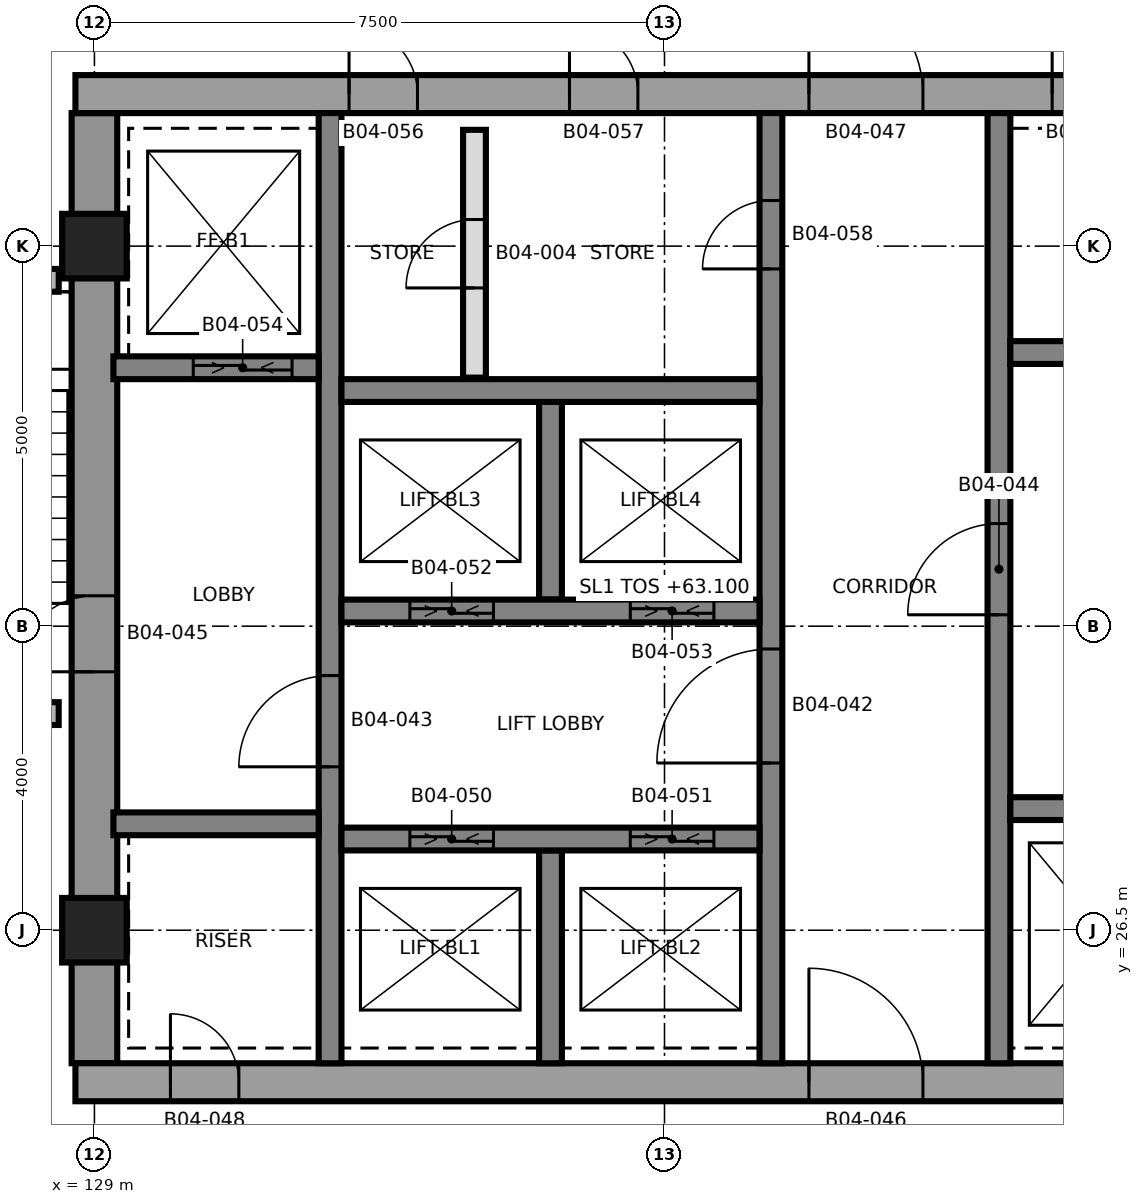
"""IFC4 building model, lengths in metres.
Left out: names, types, materials, properties, quantities, classifications, styles, units other than length and angle.
Written with IfcOpenShell. Run it as: python <this file> out.ifc"""

import sys

from ifc_helpers import new_model, si_unit, direction, frame, frame_2d, origin, origin_2d, place, context, subcontext, project, spatial, rectangle, extrude, element, fill, save


model = new_model("IFC4")
c1 = context("Model", 3, precision=1e-05, world=origin(), true_north=direction((0.0, 1.0)))
c2 = subcontext(c1, "Body", "Model", "MODEL_VIEW")
j1 = project(units=[si_unit("LENGTHUNIT", "METRE"), si_unit("PLANEANGLEUNIT", "RADIAN")], contexts=[c1])
p1 = place(None, origin())
s1 = spatial("IfcSite", under=j1, at=p1, CompositionType="ELEMENT")
p2 = place(p1, origin())
s2 = spatial("IfcBuilding", under=s1, at=p2, CompositionType="ELEMENT")
p3 = place(p2, frame((0.0, 0.0, 63.1)))
s3 = spatial("IfcBuildingStorey", under=s2, at=p3, CompositionType="ELEMENT", Elevation=63.1)
p4 = place(p3, frame((129.0, 24.75, 0.0), z_axis=(0.0, 0.0, 1.0), x_axis=(0.0, 1.0, 0.0)))
e1 = element("IfcWall", 1, at=p4, inside=s3, PredefinedType="SHEAR", context=c2, shape_type="SweptSolid", body=[
    extrude(rectangle(XDim=12.5, YDim=0.6, at=frame_2d((6.25, 0.0))), origin(), (0.0, 0.0, 1.0), 3.7),
])
p5 = place(p4, frame((5.15, 0.0, 0.0)))
e2 = element("IfcOpeningElement", 2, at=p5, cuts=e1, PredefinedType="OPENING", context=c2, shape_type="SweptSolid", body=[
    extrude(rectangle(XDim=1.0, YDim=2.1, at=frame_2d((0.5, 1.05))), frame((0.0, 0.31, 0.0), z_axis=(0.0, -1.0, 0.0), x_axis=(1.0, 0.0, 0.0)), (0.0, 0.0, 1.0), 0.62),
])
p6 = place(p3, frame((128.75, 24.5, 0.0), z_axis=(0.0, 0.0, 1.0), x_axis=(1.0, 0.0, 0.0)))
e3 = element("IfcWall", 3, at=p6, inside=s3, PredefinedType="SHEAR", context=c2, shape_type="SweptSolid", body=[
    extrude(rectangle(XDim=15.0, YDim=0.5, at=frame_2d((7.5, 0.0))), origin(), (0.0, 0.0, 1.0), 3.7),
])
p7 = place(p6, frame((9.65, 0.0, 0.0)))
e4 = element("IfcOpeningElement", 4, at=p7, cuts=e3, PredefinedType="OPENING", context=c2, shape_type="SweptSolid", body=[
    extrude(rectangle(XDim=1.5, YDim=2.1, at=frame_2d((0.75, 1.05))), frame((0.0, 0.26, 0.0), z_axis=(0.0, -1.0, 0.0), x_axis=(1.0, 0.0, 0.0)), (0.0, 0.0, 1.0), 0.52),
])
p8 = place(p6, frame((1.25, 0.0, 0.0)))
e5 = element("IfcOpeningElement", 5, at=p8, cuts=e3, PredefinedType="OPENING", context=c2, shape_type="SweptSolid", body=[
    extrude(rectangle(XDim=0.9, YDim=2.1, at=frame_2d((0.45, 1.05))), frame((0.0, 0.26, 0.0), z_axis=(0.0, -1.0, 0.0), x_axis=(1.0, 0.0, 0.0)), (0.0, 0.0, 1.0), 0.52),
])
p9 = place(p3, frame((128.75, 37.5, 0.0), z_axis=(0.0, 0.0, 1.0), x_axis=(1.0, 0.0, 0.0)))
e6 = element("IfcWall", 6, at=p9, inside=s3, PredefinedType="SHEAR", context=c2, shape_type="SweptSolid", body=[
    extrude(rectangle(XDim=15.0, YDim=0.5, at=frame_2d((7.5, 0.0))), origin(), (0.0, 0.0, 1.0), 3.7),
])
p10 = place(p9, frame((9.65, 0.0, 0.0)))
e7 = element("IfcOpeningElement", 7, at=p10, cuts=e6, PredefinedType="OPENING", context=c2, shape_type="SweptSolid", body=[
    extrude(rectangle(XDim=1.5, YDim=2.1, at=frame_2d((0.75, 1.05))), frame((0.0, 0.26, 0.0), z_axis=(0.0, -1.0, 0.0), x_axis=(1.0, 0.0, 0.0)), (0.0, 0.0, 1.0), 0.52),
])
p11 = place(p9, frame((12.85, 0.0, 0.0)))
e8 = element("IfcOpeningElement", 8, at=p11, cuts=e6, PredefinedType="OPENING", context=c2, shape_type="SweptSolid", body=[
    extrude(rectangle(XDim=0.9, YDim=2.1, at=frame_2d((0.45, 1.05))), frame((0.0, 0.26, 0.0), z_axis=(0.0, -1.0, 0.0), x_axis=(1.0, 0.0, 0.0)), (0.0, 0.0, 1.0), 0.52),
])
p12 = place(p9, frame((3.6, 0.0, 0.0)))
e9 = element("IfcOpeningElement", 9, at=p12, cuts=e6, PredefinedType="OPENING", context=c2, shape_type="SweptSolid", body=[
    extrude(rectangle(XDim=0.9, YDim=2.1, at=frame_2d((0.45, 1.05))), frame((0.0, 0.26, 0.0), z_axis=(0.0, -1.0, 0.0), x_axis=(1.0, 0.0, 0.0)), (0.0, 0.0, 1.0), 0.52),
])
p13 = place(p9, frame((6.5, 0.0, 0.0)))
e10 = element("IfcOpeningElement", 10, at=p13, cuts=e6, PredefinedType="OPENING", context=c2, shape_type="SweptSolid", body=[
    extrude(rectangle(XDim=0.9, YDim=2.1, at=frame_2d((0.45, 1.05))), frame((0.0, 0.26, 0.0), z_axis=(0.0, -1.0, 0.0), x_axis=(1.0, 0.0, 0.0)), (0.0, 0.0, 1.0), 0.52),
])
p14 = place(p3, frame((132.1, 24.75, 0.0), z_axis=(0.0, 0.0, 1.0), x_axis=(0.0, 1.0, 0.0)))
e11 = element("IfcWall", 11, at=p14, inside=s3, PredefinedType="SHEAR", context=c2, shape_type="SweptSolid", body=[
    extrude(rectangle(XDim=12.5, YDim=0.3, at=frame_2d((6.25, 0.0))), origin(), (0.0, 0.0, 1.0), 3.7),
])
p15 = place(p14, frame((3.9, 0.0, 0.0)))
e12 = element("IfcOpeningElement", 12, at=p15, cuts=e11, PredefinedType="OPENING", context=c2, shape_type="SweptSolid", body=[
    extrude(rectangle(XDim=1.2, YDim=2.1, at=frame_2d((0.6, 1.05))), frame((0.0, 0.16, 0.0), z_axis=(0.0, -1.0, 0.0), x_axis=(1.0, 0.0, 0.0)), (0.0, 0.0, 1.0), 0.32),
])
p16 = place(p3, frame((137.9, 24.75, 0.0), z_axis=(0.0, 0.0, 1.0), x_axis=(0.0, 1.0, 0.0)))
e13 = element("IfcWall", 13, at=p16, inside=s3, PredefinedType="SHEAR", context=c2, shape_type="SweptSolid", body=[
    extrude(rectangle(XDim=12.5, YDim=0.3, at=frame_2d((6.25, 0.0))), origin(), (0.0, 0.0, 1.0), 3.7),
])
p17 = place(p16, frame((3.95, 0.0, 0.0)))
e14 = element("IfcOpeningElement", 14, at=p17, cuts=e13, PredefinedType="OPENING", context=c2, shape_type="SweptSolid", body=[
    extrude(rectangle(XDim=1.5, YDim=2.1, at=frame_2d((0.75, 1.05))), frame((0.0, 0.16, 0.0), z_axis=(0.0, -1.0, 0.0), x_axis=(1.0, 0.0, 0.0)), (0.0, 0.0, 1.0), 0.32),
])
p18 = place(p16, frame((10.45, 0.0, 0.0)))
e15 = element("IfcOpeningElement", 15, at=p18, cuts=e13, PredefinedType="OPENING", context=c2, shape_type="SweptSolid", body=[
    extrude(rectangle(XDim=0.9, YDim=2.1, at=frame_2d((0.45, 1.05))), frame((0.0, 0.16, 0.0), z_axis=(0.0, -1.0, 0.0), x_axis=(1.0, 0.0, 0.0)), (0.0, 0.0, 1.0), 0.32),
])
p19 = place(p3, frame((140.9, 24.75, 0.0), z_axis=(0.0, 0.0, 1.0), x_axis=(0.0, 1.0, 0.0)))
e16 = element("IfcWall", 16, at=p19, inside=s3, PredefinedType="SHEAR", context=c2, shape_type="SweptSolid", body=[
    extrude(rectangle(XDim=12.5, YDim=0.3, at=frame_2d((6.25, 0.0))), origin(), (0.0, 0.0, 1.0), 3.7),
])
p20 = place(p19, frame((5.9, 0.0, 0.0)))
e17 = element("IfcOpeningElement", 17, at=p20, cuts=e16, PredefinedType="OPENING", context=c2, shape_type="SweptSolid", body=[
    extrude(rectangle(XDim=1.2, YDim=2.1, at=frame_2d((0.6, 1.05))), frame((0.0, 0.16, 0.0), z_axis=(0.0, -1.0, 0.0), x_axis=(1.0, 0.0, 0.0)), (0.0, 0.0, 1.0), 0.32),
])
p21 = place(p3, frame((135.0, 24.75, 0.0), z_axis=(0.0, 0.0, 1.0), x_axis=(0.0, 1.0, 0.0)))
e18 = element("IfcWall", 18, at=p21, inside=s3, PredefinedType="SHEAR", context=c2, shape_type="SweptSolid", body=[
    extrude(rectangle(XDim=2.8, YDim=0.3, at=frame_2d((1.4, 0.0))), origin(), (0.0, 0.0, 1.0), 3.7),
])
p22 = place(p3, frame((135.0, 30.85, 0.0), z_axis=(0.0, 0.0, 1.0), x_axis=(0.0, 1.0, 0.0)))
e19 = element("IfcWall", 19, at=p22, inside=s3, PredefinedType="SHEAR", context=c2, shape_type="SweptSolid", body=[
    extrude(rectangle(XDim=2.6, YDim=0.3, at=frame_2d((1.3, 0.0))), origin(), (0.0, 0.0, 1.0), 3.7),
])
p23 = place(p3, frame((132.25, 27.7, 0.0), z_axis=(0.0, 0.0, 1.0), x_axis=(1.0, 0.0, 0.0)))
e20 = element("IfcWall", 20, at=p23, inside=s3, PredefinedType="SHEAR", context=c2, shape_type="SweptSolid", body=[
    extrude(rectangle(XDim=5.5, YDim=0.3, at=frame_2d((2.75, 0.0))), origin(), (0.0, 0.0, 1.0), 3.7),
])
p24 = place(p23, frame((0.9, 0.0, 0.0)))
e21 = element("IfcOpeningElement", 21, at=p24, cuts=e20, PredefinedType="OPENING", context=c2, shape_type="SweptSolid", body=[
    extrude(rectangle(XDim=1.1, YDim=2.4, at=frame_2d((0.55, 1.2))), frame((0.0, 0.16, 0.0), z_axis=(0.0, -1.0, 0.0), x_axis=(1.0, 0.0, 0.0)), (0.0, 0.0, 1.0), 0.32),
])
p25 = place(p23, frame((3.8, 0.0, 0.0)))
e22 = element("IfcOpeningElement", 22, at=p25, cuts=e20, PredefinedType="OPENING", context=c2, shape_type="SweptSolid", body=[
    extrude(rectangle(XDim=1.1, YDim=2.4, at=frame_2d((0.55, 1.2))), frame((0.0, 0.16, 0.0), z_axis=(0.0, -1.0, 0.0), x_axis=(1.0, 0.0, 0.0)), (0.0, 0.0, 1.0), 0.32),
])
p26 = place(p3, frame((132.25, 30.7, 0.0), z_axis=(0.0, 0.0, 1.0), x_axis=(1.0, 0.0, 0.0)))
e23 = element("IfcWall", 23, at=p26, inside=s3, PredefinedType="SHEAR", context=c2, shape_type="SweptSolid", body=[
    extrude(rectangle(XDim=5.5, YDim=0.3, at=frame_2d((2.75, 0.0))), origin(), (0.0, 0.0, 1.0), 3.7),
])
p27 = place(p26, frame((0.9, 0.0, 0.0)))
e24 = element("IfcOpeningElement", 24, at=p27, cuts=e23, PredefinedType="OPENING", context=c2, shape_type="SweptSolid", body=[
    extrude(rectangle(XDim=1.1, YDim=2.4, at=frame_2d((0.55, 1.2))), frame((0.0, 0.16, 0.0), z_axis=(0.0, -1.0, 0.0), x_axis=(1.0, 0.0, 0.0)), (0.0, 0.0, 1.0), 0.32),
])
p28 = place(p26, frame((3.8, 0.0, 0.0)))
e25 = element("IfcOpeningElement", 25, at=p28, cuts=e23, PredefinedType="OPENING", context=c2, shape_type="SweptSolid", body=[
    extrude(rectangle(XDim=1.1, YDim=2.4, at=frame_2d((0.55, 1.2))), frame((0.0, 0.16, 0.0), z_axis=(0.0, -1.0, 0.0), x_axis=(1.0, 0.0, 0.0)), (0.0, 0.0, 1.0), 0.32),
])
p29 = place(p3, frame((132.25, 33.6, 0.0), z_axis=(0.0, 0.0, 1.0), x_axis=(1.0, 0.0, 0.0)))
e26 = element("IfcWall", 26, at=p29, inside=s3, PredefinedType="SHEAR", context=c2, shape_type="SweptSolid", body=[
    extrude(rectangle(XDim=5.5, YDim=0.3, at=frame_2d((2.75, 0.0))), origin(), (0.0, 0.0, 1.0), 3.7),
])
p30 = place(p3, frame((129.25, 27.9, 0.0), z_axis=(0.0, 0.0, 1.0), x_axis=(1.0, 0.0, 0.0)))
e27 = element("IfcWall", 27, at=p30, inside=s3, PredefinedType="SHEAR", context=c2, shape_type="SweptSolid", body=[
    extrude(rectangle(XDim=2.7, YDim=0.3, at=frame_2d((1.35, 0.0))), origin(), (0.0, 0.0, 1.0), 3.7),
])
p31 = place(p3, frame((129.25, 33.9, 0.0), z_axis=(0.0, 0.0, 1.0), x_axis=(1.0, 0.0, 0.0)))
e28 = element("IfcWall", 28, at=p31, inside=s3, PredefinedType="SHEAR", context=c2, shape_type="SweptSolid", body=[
    extrude(rectangle(XDim=2.7, YDim=0.3, at=frame_2d((1.35, 0.0))), origin(), (0.0, 0.0, 1.0), 3.7),
])
p32 = place(p31, frame((1.05, 0.0, 0.0)))
e29 = element("IfcOpeningElement", 29, at=p32, cuts=e28, PredefinedType="OPENING", context=c2, shape_type="SweptSolid", body=[
    extrude(rectangle(XDim=1.3, YDim=2.4, at=frame_2d((0.65, 1.2))), frame((0.0, 0.16, 0.0), z_axis=(0.0, -1.0, 0.0), x_axis=(1.0, 0.0, 0.0)), (0.0, 0.0, 1.0), 0.32),
])
p33 = place(p3, frame((141.05, 28.1, 0.0), z_axis=(0.0, 0.0, 1.0), x_axis=(1.0, 0.0, 0.0)))
e30 = element("IfcWall", 30, at=p33, inside=s3, PredefinedType="SHEAR", context=c2, shape_type="SweptSolid", body=[
    extrude(rectangle(XDim=2.7, YDim=0.3, at=frame_2d((1.35, 0.0))), origin(), (0.0, 0.0, 1.0), 3.7),
])
p34 = place(p33, frame((0.75, 0.0, 0.0)))
e31 = element("IfcOpeningElement", 31, at=p34, cuts=e30, PredefinedType="OPENING", context=c2, shape_type="SweptSolid", body=[
    extrude(rectangle(XDim=1.3, YDim=2.4, at=frame_2d((0.65, 1.2))), frame((0.0, 0.16, 0.0), z_axis=(0.0, -1.0, 0.0), x_axis=(1.0, 0.0, 0.0)), (0.0, 0.0, 1.0), 0.32),
])
p35 = place(p3, frame((141.05, 34.1, 0.0), z_axis=(0.0, 0.0, 1.0), x_axis=(1.0, 0.0, 0.0)))
e32 = element("IfcWall", 32, at=p35, inside=s3, PredefinedType="SHEAR", context=c2, shape_type="SweptSolid", body=[
    extrude(rectangle(XDim=2.7, YDim=0.3, at=frame_2d((1.35, 0.0))), origin(), (0.0, 0.0, 1.0), 3.7),
])
for number, where, z_axis, x_axis in (
    (33, (129.0, 26.5, 0.0), (0.0, 0.0, 1.0), (1.0, 0.0, 0.0)),
    (34, (129.0, 35.5, 0.0), (0.0, 0.0, 1.0), (1.0, 0.0, 0.0)),
):
    element("IfcColumn", number, at=place(p3, frame(where, z_axis=z_axis, x_axis=x_axis)), inside=s3, PredefinedType="COLUMN", context=c2, shape_type="SweptSolid", body=[
        extrude(rectangle(XDim=0.85, YDim=0.85, at=origin_2d()), origin(), (0.0, 0.0, 1.0), 3.7),
    ])
p36 = place(p3, frame((125.7, 29.35, 0.0), z_axis=(0.0, 0.0, 1.0), x_axis=(1.0, 0.0, 0.0)))
e35 = element("IfcWall", 35, at=p36, inside=s3, PredefinedType="SHEAR", context=c2, shape_type="SweptSolid", body=[
    extrude(rectangle(XDim=2.83, YDim=0.3, at=frame_2d((1.415, 0.0))), origin(), (0.0, 0.0, 1.0), 3.4),
])
p37 = place(p36, frame((0.975, 0.0, 0.0)))
e36 = element("IfcOpeningElement", 36, at=p37, cuts=e35, PredefinedType="OPENING", context=c2, shape_type="SweptSolid", body=[
    extrude(rectangle(XDim=1.2, YDim=2.1, at=frame_2d((0.6, 1.05))), frame((0.0, 0.16, 0.0), z_axis=(0.0, -1.0, 0.0), x_axis=(1.0, 0.0, 0.0)), (0.0, 0.0, 1.0), 0.32),
])
p38 = place(p3, frame((125.7, 35.05, 0.0), z_axis=(0.0, 0.0, 1.0), x_axis=(1.0, 0.0, 0.0)))
e37 = element("IfcWall", 37, at=p38, inside=s3, PredefinedType="SHEAR", context=c2, shape_type="SweptSolid", body=[
    extrude(rectangle(XDim=2.83, YDim=0.3, at=frame_2d((1.415, 0.0))), origin(), (0.0, 0.0, 1.0), 3.4),
])
p39 = place(p3, frame((134.0, 33.77, 0.0), z_axis=(0.0, 0.0, 1.0), x_axis=(0.0, 1.0, 0.0)))
e38 = element("IfcWall", 38, at=p39, inside=s3, PredefinedType="PARTITIONING", context=c2, shape_type="SweptSolid", body=[
    extrude(rectangle(XDim=3.26, YDim=0.3, at=frame_2d((1.63, 0.0))), origin(), (0.0, 0.0, 1.0), 3.4),
])
p40 = place(p39, frame((1.18, 0.0, 0.0)))
e39 = element("IfcOpeningElement", 39, at=p40, cuts=e38, PredefinedType="OPENING", context=c2, shape_type="SweptSolid", body=[
    extrude(rectangle(XDim=0.9, YDim=2.1, at=frame_2d((0.45, 1.05))), frame((0.0, 0.16, 0.0), z_axis=(0.0, -1.0, 0.0), x_axis=(1.0, 0.0, 0.0)), (0.0, 0.0, 1.0), 0.32),
])
p41 = place(p40, origin())
e40 = element("IfcDoor", 40, at=p41, inside=s3, OperationType="SINGLE_SWING_RIGHT", PredefinedType="DOOR", context=c2, shape_type="SweptSolid", body=[
    extrude(rectangle(XDim=0.9, YDim=2.1, at=frame_2d((0.45, 1.05))), frame((0.0, 0.025, 0.0), z_axis=(0.0, -1.0, 0.0), x_axis=(1.0, 0.0, 0.0)), (0.0, 0.0, 1.0), 0.05),
])
fill(e39, e40)
p42 = place(p17, origin())
e41 = element("IfcDoor", 41, at=p42, inside=s3, OperationType="SINGLE_SWING_RIGHT", PredefinedType="DOOR", context=c2, shape_type="SweptSolid", body=[
    extrude(rectangle(XDim=1.5, YDim=2.1, at=frame_2d((0.75, 1.05))), frame((0.0, 0.025, 0.0), z_axis=(0.0, -1.0, 0.0), x_axis=(1.0, 0.0, 0.0)), (0.0, 0.0, 1.0), 0.05),
])
fill(e14, e41)
p43 = place(p15, origin())
e42 = element("IfcDoor", 42, at=p43, inside=s3, OperationType="SINGLE_SWING_LEFT", PredefinedType="DOOR", context=c2, shape_type="SweptSolid", body=[
    extrude(rectangle(XDim=1.2, YDim=2.1, at=frame_2d((0.6, 1.05))), frame((0.0, 0.025, 0.0), z_axis=(0.0, -1.0, 0.0), x_axis=(1.0, 0.0, 0.0)), (0.0, 0.0, 1.0), 0.05),
])
fill(e12, e42)
p44 = place(p20, origin())
e43 = element("IfcDoor", 43, at=p44, inside=s3, OperationType="SINGLE_SWING_RIGHT", PredefinedType="DOOR", context=c2, shape_type="SweptSolid", body=[
    extrude(rectangle(XDim=1.2, YDim=2.1, at=frame_2d((0.6, 1.05))), frame((0.0, 0.025, 0.0), z_axis=(0.0, -1.0, 0.0), x_axis=(1.0, 0.0, 0.0)), (0.0, 0.0, 1.0), 0.05),
])
fill(e17, e43)
p45 = place(p5, origin())
e44 = element("IfcDoor", 44, at=p45, inside=s3, OperationType="SINGLE_SWING_RIGHT", PredefinedType="DOOR", context=c2, shape_type="SweptSolid", body=[
    extrude(rectangle(XDim=1.0, YDim=2.1, at=frame_2d((0.5, 1.05))), frame((0.0, 0.025, 0.0), z_axis=(0.0, -1.0, 0.0), x_axis=(1.0, 0.0, 0.0)), (0.0, 0.0, 1.0), 0.05),
])
fill(e2, e44)
p46 = place(p7, origin())
e45 = element("IfcDoor", 45, at=p46, inside=s3, OperationType="SINGLE_SWING_LEFT", PredefinedType="DOOR", context=c2, shape_type="SweptSolid", body=[
    extrude(rectangle(XDim=1.5, YDim=2.1, at=frame_2d((0.75, 1.05))), frame((0.0, 0.025, 0.0), z_axis=(0.0, -1.0, 0.0), x_axis=(1.0, 0.0, 0.0)), (0.0, 0.0, 1.0), 0.05),
])
fill(e4, e45)
p47 = place(p10, origin())
e46 = element("IfcDoor", 46, at=p47, inside=s3, OperationType="SINGLE_SWING_RIGHT", PredefinedType="DOOR", context=c2, shape_type="SweptSolid", body=[
    extrude(rectangle(XDim=1.5, YDim=2.1, at=frame_2d((0.75, 1.05))), frame((0.0, 0.025, 0.0), z_axis=(0.0, -1.0, 0.0), x_axis=(1.0, 0.0, 0.0)), (0.0, 0.0, 1.0), 0.05),
])
fill(e7, e46)
p48 = place(p8, origin())
e47 = element("IfcDoor", 47, at=p48, inside=s3, OperationType="SINGLE_SWING_LEFT", PredefinedType="DOOR", context=c2, shape_type="SweptSolid", body=[
    extrude(rectangle(XDim=0.9, YDim=2.1, at=frame_2d((0.45, 1.05))), frame((0.0, 0.025, 0.0), z_axis=(0.0, -1.0, 0.0), x_axis=(1.0, 0.0, 0.0)), (0.0, 0.0, 1.0), 0.05),
])
fill(e5, e47)
p49 = place(p11, origin())
e48 = element("IfcDoor", 48, at=p49, inside=s3, OperationType="SINGLE_SWING_RIGHT", PredefinedType="DOOR", context=c2, shape_type="SweptSolid", body=[
    extrude(rectangle(XDim=0.9, YDim=2.1, at=frame_2d((0.45, 1.05))), frame((0.0, 0.025, 0.0), z_axis=(0.0, -1.0, 0.0), x_axis=(1.0, 0.0, 0.0)), (0.0, 0.0, 1.0), 0.05),
])
fill(e8, e48)
p50 = place(p24, origin())
e49 = element("IfcDoor", 49, at=p50, inside=s3, OperationType="SLIDING_TO_LEFT", PredefinedType="DOOR", context=c2, shape_type="SweptSolid", body=[
    extrude(rectangle(XDim=1.1, YDim=2.4, at=frame_2d((0.55, 1.2))), frame((0.0, 0.025, 0.0), z_axis=(0.0, -1.0, 0.0), x_axis=(1.0, 0.0, 0.0)), (0.0, 0.0, 1.0), 0.05),
])
fill(e21, e49)
p51 = place(p25, origin())
e50 = element("IfcDoor", 50, at=p51, inside=s3, OperationType="SLIDING_TO_LEFT", PredefinedType="DOOR", context=c2, shape_type="SweptSolid", body=[
    extrude(rectangle(XDim=1.1, YDim=2.4, at=frame_2d((0.55, 1.2))), frame((0.0, 0.025, 0.0), z_axis=(0.0, -1.0, 0.0), x_axis=(1.0, 0.0, 0.0)), (0.0, 0.0, 1.0), 0.05),
])
fill(e22, e50)
p52 = place(p27, origin())
e51 = element("IfcDoor", 51, at=p52, inside=s3, OperationType="SLIDING_TO_LEFT", PredefinedType="DOOR", context=c2, shape_type="SweptSolid", body=[
    extrude(rectangle(XDim=1.1, YDim=2.4, at=frame_2d((0.55, 1.2))), frame((0.0, 0.025, 0.0), z_axis=(0.0, -1.0, 0.0), x_axis=(1.0, 0.0, 0.0)), (0.0, 0.0, 1.0), 0.05),
])
fill(e24, e51)
p53 = place(p28, origin())
e52 = element("IfcDoor", 52, at=p53, inside=s3, OperationType="SLIDING_TO_LEFT", PredefinedType="DOOR", context=c2, shape_type="SweptSolid", body=[
    extrude(rectangle(XDim=1.1, YDim=2.4, at=frame_2d((0.55, 1.2))), frame((0.0, 0.025, 0.0), z_axis=(0.0, -1.0, 0.0), x_axis=(1.0, 0.0, 0.0)), (0.0, 0.0, 1.0), 0.05),
])
fill(e25, e52)
p54 = place(p32, origin())
e53 = element("IfcDoor", 53, at=p54, inside=s3, OperationType="SLIDING_TO_LEFT", PredefinedType="DOOR", context=c2, shape_type="SweptSolid", body=[
    extrude(rectangle(XDim=1.3, YDim=2.4, at=frame_2d((0.65, 1.2))), frame((0.0, 0.025, 0.0), z_axis=(0.0, -1.0, 0.0), x_axis=(1.0, 0.0, 0.0)), (0.0, 0.0, 1.0), 0.05),
])
fill(e29, e53)
p55 = place(p12, origin())
e54 = element("IfcDoor", 54, at=p55, inside=s3, OperationType="SINGLE_SWING_LEFT", PredefinedType="DOOR", context=c2, shape_type="SweptSolid", body=[
    extrude(rectangle(XDim=0.9, YDim=2.1, at=frame_2d((0.45, 1.05))), frame((0.0, 0.025, 0.0), z_axis=(0.0, -1.0, 0.0), x_axis=(1.0, 0.0, 0.0)), (0.0, 0.0, 1.0), 0.05),
])
fill(e9, e54)
p56 = place(p13, origin())
e55 = element("IfcDoor", 55, at=p56, inside=s3, OperationType="SINGLE_SWING_RIGHT", PredefinedType="DOOR", context=c2, shape_type="SweptSolid", body=[
    extrude(rectangle(XDim=0.9, YDim=2.1, at=frame_2d((0.45, 1.05))), frame((0.0, 0.025, 0.0), z_axis=(0.0, -1.0, 0.0), x_axis=(1.0, 0.0, 0.0)), (0.0, 0.0, 1.0), 0.05),
])
fill(e10, e55)
p57 = place(p18, origin())
e56 = element("IfcDoor", 56, at=p57, inside=s3, OperationType="SINGLE_SWING_RIGHT", PredefinedType="DOOR", context=c2, shape_type="SweptSolid", body=[
    extrude(rectangle(XDim=0.9, YDim=2.1, at=frame_2d((0.45, 1.05))), frame((0.0, 0.025, 0.0), z_axis=(0.0, -1.0, 0.0), x_axis=(1.0, 0.0, 0.0)), (0.0, 0.0, 1.0), 0.05),
])
fill(e15, e56)
save(model, sys.argv[1])
